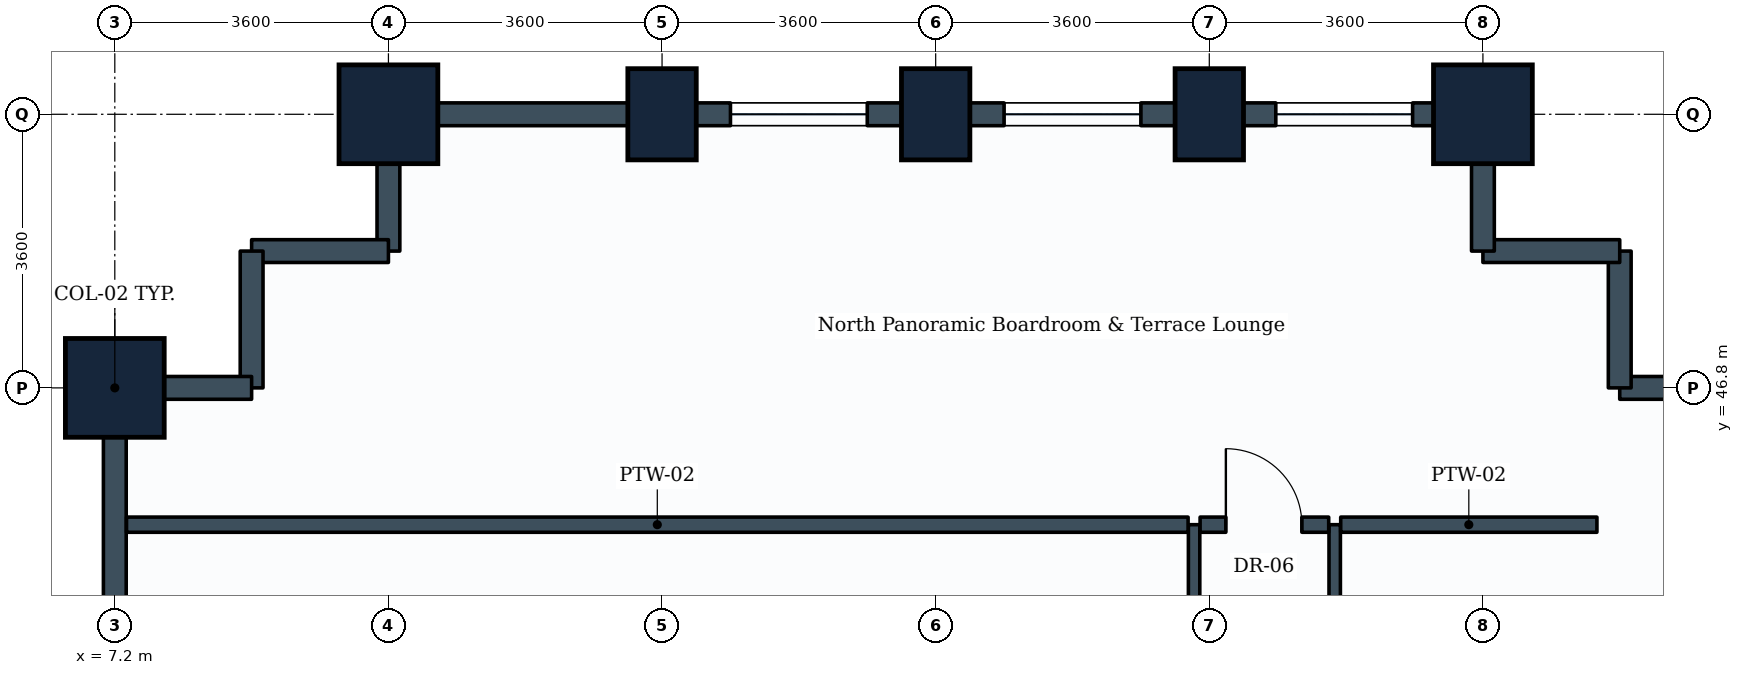
"""IFC4 building model, lengths in metres.
Left out: names, types, materials, properties, quantities, classifications, styles, units other than length and angle.
Written with IfcOpenShell. Run it as: python <this file> out.ifc"""

import sys

from ifc_helpers import new_model, si_unit, direction, frame, frame_2d, origin, origin_2d, place, context, subcontext, project, spatial, rectangle, extrude, element, fill, save


model = new_model("IFC4")
c1 = context("Model", 3, precision=1e-05, world=origin(), true_north=direction((0.0, 1.0)))
c2 = subcontext(c1, "Body", "Model", "MODEL_VIEW")
j1 = project(units=[si_unit("LENGTHUNIT", "METRE"), si_unit("PLANEANGLEUNIT", "RADIAN")], contexts=[c1])
p1 = place(None, origin())
s1 = spatial("IfcSite", under=j1, at=p1, CompositionType="ELEMENT")
p2 = place(p1, origin())
s2 = spatial("IfcBuilding", under=s1, at=p2, CompositionType="ELEMENT")
p3 = place(p2, frame((0.0, 0.0, 70.8)))
s3 = spatial("IfcBuildingStorey", under=s2, at=p3, CompositionType="ELEMENT", Elevation=70.8)
for number, where, z_axis, x_axis in (
    (1, (7.2, 46.8, 0.0), (0.0, 0.0, 1.0), (0.0, 1.0, 0.0)),
    (2, (10.8, 50.4, 0.0), (0.0, 0.0, 1.0), (1.0, 0.0, 0.0)),
):
    element("IfcColumn", number, at=place(p3, frame(where, z_axis=z_axis, x_axis=x_axis)), inside=s3, PredefinedType="COLUMN", context=c2, shape_type="SweptSolid", body=[
        extrude(rectangle(XDim=1.3, YDim=1.3, at=origin_2d()), origin(), (0.0, 0.0, 1.0), 3.9),
    ])
for number, where, z_axis, x_axis in (
    (3, (14.4, 50.4, 0.0), (0.0, 0.0, 1.0), (1.0, 0.0, 0.0)),
    (4, (18.0, 50.4, 0.0), (0.0, 0.0, 1.0), (1.0, 0.0, 0.0)),
    (5, (21.6, 50.4, 0.0), (0.0, 0.0, 1.0), (1.0, 0.0, 0.0)),
):
    element("IfcColumn", number, at=place(p3, frame(where, z_axis=z_axis, x_axis=x_axis)), inside=s3, PredefinedType="COLUMN", context=c2, shape_type="SweptSolid", body=[
        extrude(rectangle(XDim=0.9, YDim=1.2, at=origin_2d()), origin(), (0.0, 0.0, 1.0), 3.9),
    ])
p4 = place(p3, frame((25.2, 50.4, 0.0), z_axis=(0.0, 0.0, 1.0), x_axis=(1.0, 0.0, 0.0)))
e6 = element("IfcColumn", 6, at=p4, inside=s3, PredefinedType="COLUMN", context=c2, shape_type="SweptSolid", body=[
    extrude(rectangle(XDim=1.3, YDim=1.3, at=origin_2d()), origin(), (0.0, 0.0, 1.0), 3.9),
])
p5 = place(p3, frame((27.0, 46.8, 0.0), z_axis=(0.0, 0.0, 1.0), x_axis=(1.0, 0.0, 0.0)))
e7 = element("IfcWall", 7, at=p5, inside=s3, PredefinedType="STANDARD", context=c2, shape_type="SweptSolid", body=[
    extrude(rectangle(XDim=1.8, YDim=0.3, at=frame_2d((0.9, 0.0))), origin(), (0.0, 0.0, 1.0), 2.93),
])
for number, where, z_axis, x_axis in (
    (8, (27.0, 46.8, 0.0), (0.0, 0.0, 1.0), (0.0, 1.0, 0.0)),
    (9, (25.2, 48.6, 0.0), (0.0, 0.0, 1.0), (1.0, 0.0, 0.0)),
):
    element("IfcWall", number, at=place(p3, frame(where, z_axis=z_axis, x_axis=x_axis)), inside=s3, PredefinedType="STANDARD", context=c2, shape_type="SweptSolid", body=[
        extrude(rectangle(XDim=1.8, YDim=0.3, at=frame_2d((0.9, 0.0))), origin(), (0.0, 0.0, 1.0), 3.565),
    ])
p6 = place(p3, frame((25.2, 48.6, 0.0), z_axis=(0.0, 0.0, 1.0), x_axis=(0.0, 1.0, 0.0)))
e10 = element("IfcWall", 10, at=p6, inside=s3, PredefinedType="STANDARD", context=c2, shape_type="SweptSolid", body=[
    extrude(rectangle(XDim=1.8, YDim=0.3, at=frame_2d((0.9, 0.0))), origin(), (0.0, 0.0, 1.0), 2.93),
])
p7 = place(p3, frame((21.6, 50.4, 0.0), z_axis=(0.0, 0.0, 1.0), x_axis=(1.0, 0.0, 0.0)))
e11 = element("IfcWall", 11, at=p7, inside=s3, PredefinedType="STANDARD", context=c2, shape_type="SweptSolid", body=[
    extrude(rectangle(XDim=3.6, YDim=0.3, at=frame_2d((1.8, 0.0))), origin(), (0.0, 0.0, 1.0), 2.93),
])
p8 = place(p7, frame((0.875, 0.0, 0.85)))
e12 = element("IfcOpeningElement", 12, at=p8, cuts=e11, PredefinedType="OPENING", context=c2, shape_type="SweptSolid", body=[
    extrude(rectangle(XDim=1.8, YDim=1.35, at=frame_2d((0.9, 0.675))), frame((0.0, 0.16, 0.0), z_axis=(0.0, -1.0, 0.0), x_axis=(1.0, 0.0, 0.0)), (0.0, 0.0, 1.0), 0.32),
])
p9 = place(p3, frame((18.0, 50.4, 0.0), z_axis=(0.0, 0.0, 1.0), x_axis=(1.0, 0.0, 0.0)))
e13 = element("IfcWall", 13, at=p9, inside=s3, PredefinedType="STANDARD", context=c2, shape_type="SweptSolid", body=[
    extrude(rectangle(XDim=3.6, YDim=0.3, at=frame_2d((1.8, 0.0))), origin(), (0.0, 0.0, 1.0), 2.93),
])
p10 = place(p9, frame((0.9, 0.0, 0.85)))
e14 = element("IfcOpeningElement", 14, at=p10, cuts=e13, PredefinedType="OPENING", context=c2, shape_type="SweptSolid", body=[
    extrude(rectangle(XDim=1.8, YDim=1.35, at=frame_2d((0.9, 0.675))), frame((0.0, 0.16, 0.0), z_axis=(0.0, -1.0, 0.0), x_axis=(1.0, 0.0, 0.0)), (0.0, 0.0, 1.0), 0.32),
])
p11 = place(p3, frame((14.4, 50.4, 0.0), z_axis=(0.0, 0.0, 1.0), x_axis=(1.0, 0.0, 0.0)))
e15 = element("IfcWall", 15, at=p11, inside=s3, PredefinedType="STANDARD", context=c2, shape_type="SweptSolid", body=[
    extrude(rectangle(XDim=3.6, YDim=0.3, at=frame_2d((1.8, 0.0))), origin(), (0.0, 0.0, 1.0), 2.93),
])
p12 = place(p11, frame((0.9, 0.0, 0.85)))
e16 = element("IfcOpeningElement", 16, at=p12, cuts=e15, PredefinedType="OPENING", context=c2, shape_type="SweptSolid", body=[
    extrude(rectangle(XDim=1.8, YDim=1.35, at=frame_2d((0.9, 0.675))), frame((0.0, 0.16, 0.0), z_axis=(0.0, -1.0, 0.0), x_axis=(1.0, 0.0, 0.0)), (0.0, 0.0, 1.0), 0.32),
])
p13 = place(p3, frame((10.8, 50.4, 0.0), z_axis=(0.0, 0.0, 1.0), x_axis=(1.0, 0.0, 0.0)))
e17 = element("IfcWall", 17, at=p13, inside=s3, PredefinedType="STANDARD", context=c2, shape_type="SweptSolid", body=[
    extrude(rectangle(XDim=3.6, YDim=0.3, at=frame_2d((1.8, 0.0))), origin(), (0.0, 0.0, 1.0), 2.93),
])
p14 = place(p3, frame((10.8, 48.6, 0.0), z_axis=(0.0, 0.0, 1.0), x_axis=(0.0, 1.0, 0.0)))
e18 = element("IfcWall", 18, at=p14, inside=s3, PredefinedType="STANDARD", context=c2, shape_type="SweptSolid", body=[
    extrude(rectangle(XDim=1.8, YDim=0.3, at=frame_2d((0.9, 0.0))), origin(), (0.0, 0.0, 1.0), 2.93),
])
for number, where, z_axis, x_axis in (
    (19, (9.0, 48.6, 0.0), (0.0, 0.0, 1.0), (1.0, 0.0, 0.0)),
    (20, (9.0, 46.8, 0.0), (0.0, 0.0, 1.0), (0.0, 1.0, 0.0)),
):
    element("IfcWall", number, at=place(p3, frame(where, z_axis=z_axis, x_axis=x_axis)), inside=s3, PredefinedType="STANDARD", context=c2, shape_type="SweptSolid", body=[
        extrude(rectangle(XDim=1.8, YDim=0.3, at=frame_2d((0.9, 0.0))), origin(), (0.0, 0.0, 1.0), 3.565),
    ])
p15 = place(p3, frame((7.2, 46.8, 0.0), z_axis=(0.0, 0.0, 1.0), x_axis=(1.0, 0.0, 0.0)))
e21 = element("IfcWall", 21, at=p15, inside=s3, PredefinedType="STANDARD", context=c2, shape_type="SweptSolid", body=[
    extrude(rectangle(XDim=1.8, YDim=0.3, at=frame_2d((0.9, 0.0))), origin(), (0.0, 0.0, 1.0), 2.93),
])
p16 = place(p3, frame((7.2, 43.2, 0.0), z_axis=(0.0, 0.0, 1.0), x_axis=(0.0, 1.0, 0.0)))
e22 = element("IfcWall", 22, at=p16, inside=s3, PredefinedType="STANDARD", context=c2, shape_type="SweptSolid", body=[
    extrude(rectangle(XDim=3.6, YDim=0.3, at=frame_2d((1.8, 0.0))), origin(), (0.0, 0.0, 1.0), 2.93),
])
p17 = place(p3, frame((21.4, 35.249, 0.0), z_axis=(0.0, 0.0, 1.0), x_axis=(0.0, 1.0, 0.0)))
e23 = element("IfcWall", 23, at=p17, inside=s3, PredefinedType="PARTITIONING", context=c2, shape_type="SweptSolid", body=[
    extrude(rectangle(XDim=9.751, YDim=0.15, at=frame_2d((4.875, 0.0))), origin(), (0.0, 0.0, 1.0), 2.96),
])
p18 = place(p17, frame((4.972, 0.0, 0.0)))
e24 = element("IfcOpeningElement", 24, at=p18, cuts=e23, PredefinedType="OPENING", context=c2, shape_type="SweptSolid", body=[
    extrude(rectangle(XDim=1.0, YDim=2.1, at=frame_2d((0.5, 1.05))), frame((0.0, 0.085, 0.0), z_axis=(0.0, -1.0, 0.0), x_axis=(1.0, 0.0, 0.0)), (0.0, 0.0, 1.0), 0.17),
])
p19 = place(p3, frame((23.25, 26.879, 0.0), z_axis=(0.0, 0.0, 1.0), x_axis=(0.0, 1.0, 0.0)))
e25 = element("IfcWall", 25, at=p19, inside=s3, PredefinedType="PARTITIONING", context=c2, shape_type="SweptSolid", body=[
    extrude(rectangle(XDim=18.121, YDim=0.15, at=frame_2d((9.061, 0.0))), origin(), (0.0, 0.0, 1.0), 3.01),
])
p20 = place(p19, frame((8.481, 0.0, 0.0)))
e26 = element("IfcOpeningElement", 26, at=p20, cuts=e25, PredefinedType="OPENING", context=c2, shape_type="SweptSolid", body=[
    extrude(rectangle(XDim=1.0, YDim=2.1, at=frame_2d((0.5, 1.05))), frame((0.0, 0.085, 0.0), z_axis=(0.0, -1.0, 0.0), x_axis=(1.0, 0.0, 0.0)), (0.0, 0.0, 1.0), 0.17),
])
p21 = place(p3, frame((7.354, 45.0, 0.0), z_axis=(0.0, 0.0, 1.0), x_axis=(1.0, 0.0, 0.0)))
e27 = element("IfcWall", 27, at=p21, inside=s3, PredefinedType="PARTITIONING", context=c2, shape_type="SweptSolid", body=[
    extrude(rectangle(XDim=13.967, YDim=0.2, at=frame_2d((6.983, 0.0))), origin(), (0.0, 0.0, 1.0), 2.93),
])
p22 = place(p3, frame((23.329, 45.0, 0.0), z_axis=(0.0, 0.0, 1.0), x_axis=(1.0, 0.0, 0.0)))
e28 = element("IfcWall", 28, at=p22, inside=s3, PredefinedType="PARTITIONING", context=c2, shape_type="SweptSolid", body=[
    extrude(rectangle(XDim=3.371, YDim=0.2, at=frame_2d((1.686, 0.0))), origin(), (0.0, 0.0, 1.0), 3.565),
])
p23 = place(p3, frame((21.479, 45.0, 0.0), z_axis=(0.0, 0.0, 1.0), x_axis=(1.0, 0.0, 0.0)))
e29 = element("IfcWall", 29, at=p23, inside=s3, PredefinedType="PARTITIONING", context=c2, shape_type="SweptSolid", body=[
    extrude(rectangle(XDim=1.692, YDim=0.2, at=frame_2d((0.846, 0.0))), origin(), (0.0, 0.0, 1.0), 3.565),
])
p24 = place(p23, frame((0.339, 0.0, 0.0)))
e30 = element("IfcOpeningElement", 30, at=p24, cuts=e29, PredefinedType="OPENING", context=c2, shape_type="SweptSolid", body=[
    extrude(rectangle(XDim=1.0, YDim=2.1, at=frame_2d((0.5, 1.05))), frame((0.0, 0.11, 0.0), z_axis=(0.0, -1.0, 0.0), x_axis=(1.0, 0.0, 0.0)), (0.0, 0.0, 1.0), 0.22),
])
p25 = place(p8, origin())
e31 = element("IfcWindow", 31, at=p25, inside=s3, PartitioningType="SINGLE_PANEL", PredefinedType="WINDOW", context=c2, shape_type="SweptSolid", body=[
    extrude(rectangle(XDim=1.8, YDim=1.35, at=frame_2d((0.9, 0.675))), frame((0.0, 0.03, 0.0), z_axis=(0.0, -1.0, 0.0), x_axis=(1.0, 0.0, 0.0)), (0.0, 0.0, 1.0), 0.06),
])
fill(e12, e31)
p26 = place(p10, origin())
e32 = element("IfcWindow", 32, at=p26, inside=s3, PartitioningType="SINGLE_PANEL", PredefinedType="WINDOW", context=c2, shape_type="SweptSolid", body=[
    extrude(rectangle(XDim=1.8, YDim=1.35, at=frame_2d((0.9, 0.675))), frame((0.0, 0.03, 0.0), z_axis=(0.0, -1.0, 0.0), x_axis=(1.0, 0.0, 0.0)), (0.0, 0.0, 1.0), 0.06),
])
fill(e14, e32)
p27 = place(p12, origin())
e33 = element("IfcWindow", 33, at=p27, inside=s3, PartitioningType="SINGLE_PANEL", PredefinedType="WINDOW", context=c2, shape_type="SweptSolid", body=[
    extrude(rectangle(XDim=1.8, YDim=1.35, at=frame_2d((0.9, 0.675))), frame((0.0, 0.03, 0.0), z_axis=(0.0, -1.0, 0.0), x_axis=(1.0, 0.0, 0.0)), (0.0, 0.0, 1.0), 0.06),
])
fill(e16, e33)
p28 = place(p24, origin())
e34 = element("IfcDoor", 34, at=p28, inside=s3, OperationType="SINGLE_SWING_LEFT", PredefinedType="DOOR", context=c2, shape_type="SweptSolid", body=[
    extrude(rectangle(XDim=1.0, YDim=2.1, at=frame_2d((0.5, 1.05))), frame((0.0, 0.025, 0.0), z_axis=(0.0, -1.0, 0.0), x_axis=(1.0, 0.0, 0.0)), (0.0, 0.0, 1.0), 0.05),
])
fill(e30, e34)
save(model, sys.argv[1])
